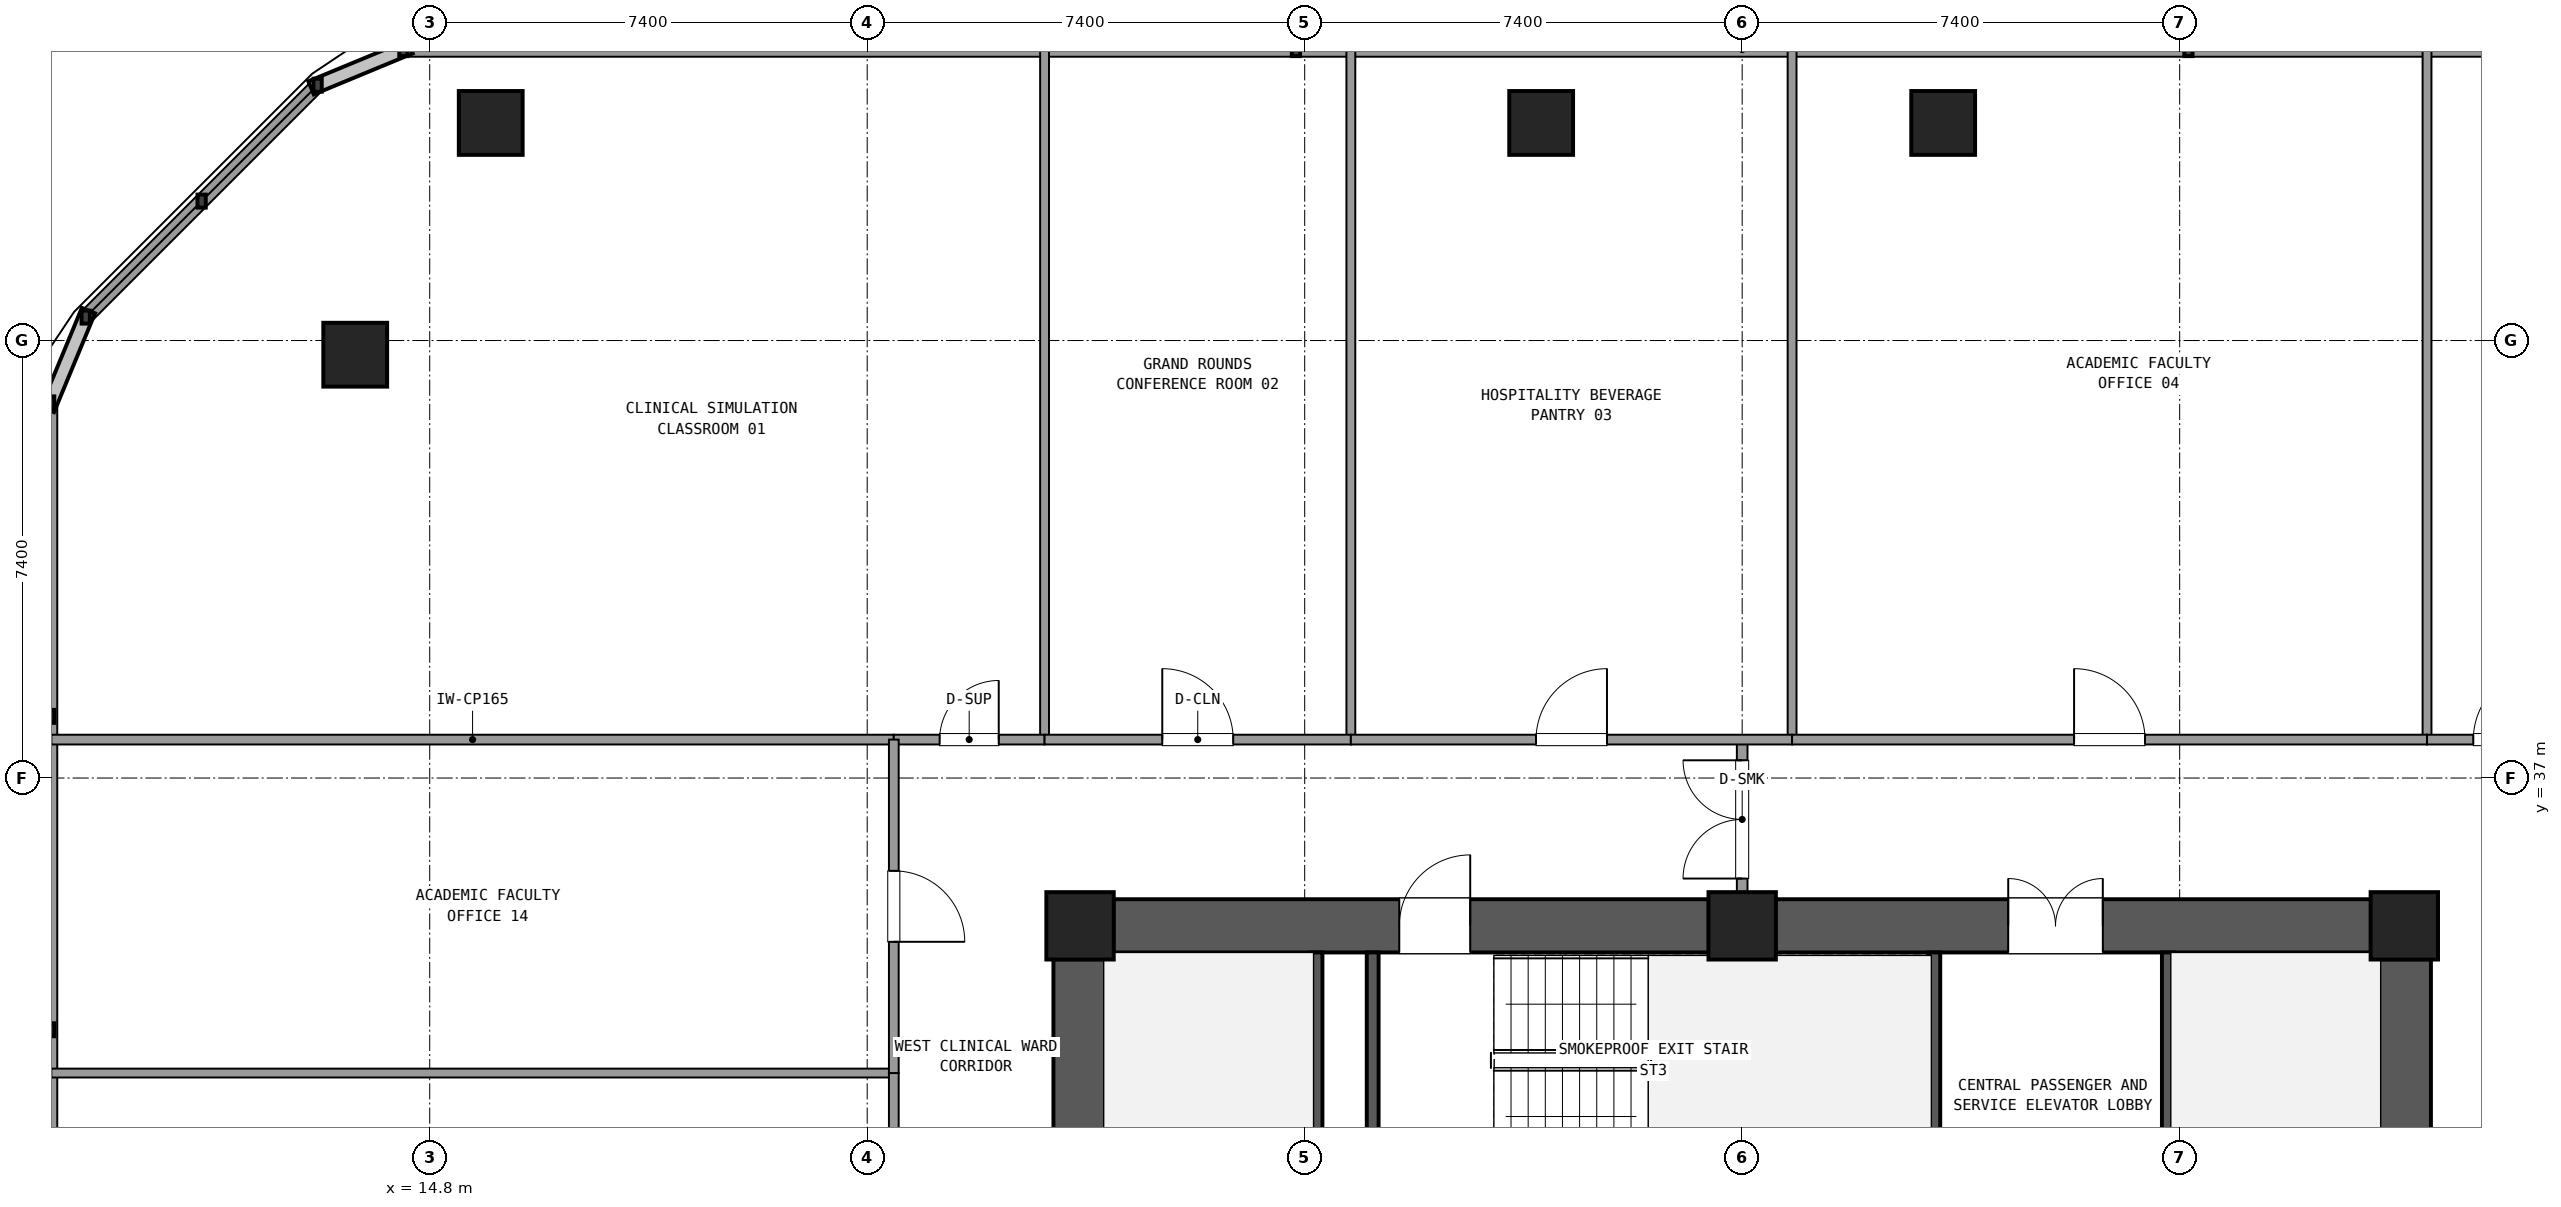
"""IFC4 building model, lengths in metres.
Left out: names, types, materials, properties, quantities, classifications, styles, units other than length and angle.
Written with IfcOpenShell. Run it as: python <this file> out.ifc"""

import sys

from ifc_helpers import new_model, si_unit, direction, frame, frame_2d, origin, origin_2d, place, context, subcontext, project, spatial, rectangle, extrude, element, fill, save


model = new_model("IFC4")
c1 = context("Model", 3, precision=1e-05, world=origin(), true_north=direction((0.0, 1.0)))
c2 = subcontext(c1, "Body", "Model", "MODEL_VIEW")
j1 = project(units=[si_unit("LENGTHUNIT", "METRE"), si_unit("PLANEANGLEUNIT", "RADIAN")], contexts=[c1])
p1 = place(None, origin())
s1 = spatial("IfcSite", under=j1, at=p1, CompositionType="ELEMENT")
p2 = place(p1, origin())
s2 = spatial("IfcBuilding", under=s1, at=p2, CompositionType="ELEMENT")
p3 = place(p2, frame((0.0, 0.0, 49.14)))
s3 = spatial("IfcBuildingStorey", under=s2, at=p3, CompositionType="ELEMENT", Elevation=49.14)
for number, where, z_axis, x_axis in (
    (1, (48.2, 34.5, 0.0), (0.0, 0.0, 1.0), (1.0, 0.0, 0.0)),
    (2, (37.0, 34.5, 0.0), (0.0, 0.0, 1.0), (1.0, 0.0, 0.0)),
    (3, (25.8, 34.5, 0.0), (0.0, 0.0, 1.0), (1.0, 0.0, 0.0)),
):
    element("IfcColumn", number, at=place(p3, frame(where, z_axis=z_axis, x_axis=x_axis)), inside=s3, PredefinedType="COLUMN", context=c2, shape_type="SweptSolid", body=[
        extrude(rectangle(XDim=1.14, YDim=1.14, at=origin_2d()), origin(), (0.0, 0.0, 1.0), 3.6),
    ])
p4 = place(p3, frame((48.2, 26.465, 0.0), z_axis=(0.0, 0.0, 1.0), x_axis=(0.0, 1.0, 0.0)))
e4 = element("IfcWall", 4, at=p4, inside=s3, PredefinedType="SHEAR", context=c2, shape_type="SweptSolid", body=[
    extrude(rectangle(XDim=7.47, YDim=0.9, at=frame_2d((3.735, 0.0))), origin(), (0.0, 0.0, 1.0), 3.32),
])
p5 = place(p3, frame((47.635, 34.5, 0.0), z_axis=(0.0, 0.0, 1.0), x_axis=(-1.0, 0.0, 0.0)))
e5 = element("IfcWall", 5, at=p5, inside=s3, PredefinedType="SHEAR", context=c2, shape_type="SweptSolid", body=[
    extrude(rectangle(XDim=10.07, YDim=0.9, at=frame_2d((5.035, 0.0))), origin(), (0.0, 0.0, 1.0), 3.32),
])
p6 = place(p5, frame((4.535, 0.0, 0.0)))
e6 = element("IfcOpeningElement", 6, at=p6, cuts=e5, PredefinedType="OPENING", context=c2, shape_type="SweptSolid", body=[
    extrude(rectangle(XDim=1.6, YDim=2.2, at=frame_2d((0.8, 1.1))), frame((0.0, 0.46, 0.0), z_axis=(0.0, -1.0, 0.0), x_axis=(1.0, 0.0, 0.0)), (0.0, 0.0, 1.0), 0.92),
])
p7 = place(p3, frame((36.435, 34.5, 0.0), z_axis=(0.0, 0.0, 1.0), x_axis=(-1.0, 0.0, 0.0)))
e7 = element("IfcWall", 7, at=p7, inside=s3, PredefinedType="SHEAR", context=c2, shape_type="SweptSolid", body=[
    extrude(rectangle(XDim=10.07, YDim=0.9, at=frame_2d((5.035, 0.0))), origin(), (0.0, 0.0, 1.0), 3.32),
])
p8 = place(p7, frame((4.035, 0.0, 0.0)))
e8 = element("IfcOpeningElement", 8, at=p8, cuts=e7, PredefinedType="OPENING", context=c2, shape_type="SweptSolid", body=[
    extrude(rectangle(XDim=1.2, YDim=2.15, at=frame_2d((0.6, 1.075))), frame((0.0, 0.46, 0.0), z_axis=(0.0, -1.0, 0.0), x_axis=(1.0, 0.0, 0.0)), (0.0, 0.0, 1.0), 0.92),
])
p9 = place(p3, frame((25.8, 33.935, 0.0), z_axis=(0.0, 0.0, 1.0), x_axis=(0.0, -1.0, 0.0)))
e9 = element("IfcWall", 9, at=p9, inside=s3, PredefinedType="SHEAR", context=c2, shape_type="SweptSolid", body=[
    extrude(rectangle(XDim=7.47, YDim=0.9, at=frame_2d((3.735, 0.0))), origin(), (0.0, 0.0, 1.0), 3.32),
])
for number, where, z_axis, x_axis in (
    (10, (40.4, 48.08, 0.0), (0.0, 0.0, 1.0), (1.0, 0.0, 0.0)),
    (11, (33.6, 48.08, 0.0), (0.0, 0.0, 1.0), (1.0, 0.0, 0.0)),
    (12, (15.832, 48.08, 0.0), (0.0, 0.0, 1.0), (1.0, 0.0, 0.0)),
    (13, (13.54, 44.16, 0.0), (0.0, 0.0, 1.0), (1.0, 0.0, 0.0)),
):
    element("IfcColumn", number, at=place(p3, frame(where, z_axis=z_axis, x_axis=x_axis)), inside=s3, PredefinedType="COLUMN", context=c2, shape_type="SweptSolid", body=[
        extrude(rectangle(XDim=1.08, YDim=1.08, at=origin_2d()), origin(), (0.0, 0.0, 1.0), 3.6),
    ])
p10 = place(p3, frame((59.645, 49.32, 0.0), z_axis=(0.0, 0.0, 1.0), x_axis=(-1.0, 0.0, 0.0)))
e14 = element("IfcWall", 14, at=p10, inside=s3, PredefinedType="SOLIDWALL", context=c2, shape_type="SweptSolid", body=[
    extrude(rectangle(XDim=45.29, YDim=0.24, at=frame_2d((22.645, 0.0))), origin(), (0.0, 0.0, 1.0), 0.85),
])
p11 = place(p3, frame((12.904, 48.719, 0.0), z_axis=(0.0, 0.0, 1.0), x_axis=(-0.707106781187, -0.707106781187, 0.0)))
e15 = element("IfcWall", 15, at=p11, inside=s3, PredefinedType="SOLIDWALL", context=c2, shape_type="SweptSolid", body=[
    extrude(rectangle(XDim=5.548, YDim=0.24, at=frame_2d((2.774, 0.0))), origin(), (0.0, 0.0, 1.0), 0.85),
])
p12 = place(p3, frame((8.38, 43.345, 0.0), z_axis=(0.0, 0.0, 1.0), x_axis=(0.0, -1.0, 0.0)))
e16 = element("IfcWall", 16, at=p12, inside=s3, PredefinedType="SOLIDWALL", context=c2, shape_type="SweptSolid", body=[
    extrude(rectangle(XDim=15.905, YDim=0.24, at=frame_2d((7.953, 0.0))), origin(), (0.0, 0.0, 1.0), 0.85),
])
for number, where, z_axis, x_axis in (
    (17, (29.8, 24.65, 0.0), (0.0, 0.0, 1.0), (0.0, 1.0, 0.0)),
    (18, (44.2, 24.65, 0.0), (0.0, 0.0, 1.0), (0.0, 1.0, 0.0)),
):
    element("IfcWall", number, at=place(p3, frame(where, z_axis=z_axis, x_axis=x_axis)), inside=s3, PredefinedType="SHEAR", context=c2, shape_type="SweptSolid", body=[
        extrude(rectangle(XDim=9.4, YDim=0.2, at=frame_2d((4.7, 0.0))), origin(), (0.0, 0.0, 1.0), 3.32),
    ])
for number, where, z_axis, x_axis in (
    (19, (30.75, 30.36, 0.0), (0.0, 0.0, 1.0), (0.0, 1.0, 0.0)),
    (20, (40.25, 30.36, 0.0), (0.0, 0.0, 1.0), (0.0, 1.0, 0.0)),
):
    element("IfcWall", number, at=place(p3, frame(where, z_axis=z_axis, x_axis=x_axis)), inside=s3, PredefinedType="SHEAR", context=c2, shape_type="SweptSolid", body=[
        extrude(rectangle(XDim=3.69, YDim=0.2, at=frame_2d((1.845, 0.0))), origin(), (0.0, 0.0, 1.0), 3.32),
    ])
p13 = place(p3, frame((37.0, 34.95, 0.0), z_axis=(0.0, 0.0, 1.0), x_axis=(0.0, 1.0, 0.0)))
e21 = element("IfcWall", 21, at=p13, inside=s3, PredefinedType="PARTITIONING", context=c2, shape_type="SweptSolid", body=[
    extrude(rectangle(XDim=2.7, YDim=0.18, at=frame_2d((1.35, 0.0))), origin(), (0.0, 0.0, 1.0), 2.61),
])
p14 = place(p13, frame((0.35, 0.0, 0.0)))
e22 = element("IfcOpeningElement", 22, at=p14, cuts=e21, PredefinedType="OPENING", context=c2, shape_type="SweptSolid", body=[
    extrude(rectangle(XDim=2.0, YDim=2.2, at=frame_2d((1.0, 1.1))), frame((0.0, 0.1, 0.0), z_axis=(0.0, -1.0, 0.0), x_axis=(1.0, 0.0, 0.0)), (0.0, 0.0, 1.0), 0.2),
])
p15 = place(p3, frame((8.4, 37.65, 0.0), z_axis=(0.0, 0.0, 1.0), x_axis=(1.0, 0.0, 0.0)))
e23 = element("IfcWall", 23, at=p15, inside=s3, PredefinedType="PARTITIONING", context=c2, shape_type="SweptSolid", body=[
    extrude(rectangle(XDim=14.25, YDim=0.165, at=frame_2d((7.125, 0.0))), origin(), (0.0, 0.0, 1.0), 2.61),
])
p16 = place(p3, frame((25.2, 37.65, 0.0), z_axis=(0.0, 0.0, 1.0), x_axis=(0.0, 1.0, 0.0)))
e24 = element("IfcWall", 24, at=p16, inside=s3, PredefinedType="PARTITIONING", context=c2, shape_type="SweptSolid", body=[
    extrude(rectangle(XDim=11.65, YDim=0.15, at=frame_2d((5.825, 0.0))), origin(), (0.0, 0.0, 1.0), 2.61),
])
p17 = place(p3, frame((22.65, 37.65, 0.0), z_axis=(0.0, 0.0, 1.0), x_axis=(1.0, 0.0, 0.0)))
e25 = element("IfcWall", 25, at=p17, inside=s3, PredefinedType="PARTITIONING", context=c2, shape_type="SweptSolid", body=[
    extrude(rectangle(XDim=2.55, YDim=0.165, at=frame_2d((1.275, 0.0))), origin(), (0.0, 0.0, 1.0), 2.61),
])
p18 = place(p17, frame((0.775, 0.0, 0.0)))
e26 = element("IfcOpeningElement", 26, at=p18, cuts=e25, PredefinedType="OPENING", context=c2, shape_type="SweptSolid", body=[
    extrude(rectangle(XDim=1.0, YDim=2.15, at=frame_2d((0.5, 1.075))), frame((0.0, 0.093, 0.0), z_axis=(0.0, -1.0, 0.0), x_axis=(1.0, 0.0, 0.0)), (0.0, 0.0, 1.0), 0.185),
])
p19 = place(p3, frame((30.381, 37.65, 0.0), z_axis=(0.0, 0.0, 1.0), x_axis=(0.0, 1.0, 0.0)))
e27 = element("IfcWall", 27, at=p19, inside=s3, PredefinedType="PARTITIONING", context=c2, shape_type="SweptSolid", body=[
    extrude(rectangle(XDim=11.65, YDim=0.15, at=frame_2d((5.825, 0.0))), origin(), (0.0, 0.0, 1.0), 2.61),
])
p20 = place(p3, frame((25.2, 37.65, 0.0), z_axis=(0.0, 0.0, 1.0), x_axis=(1.0, 0.0, 0.0)))
e28 = element("IfcWall", 28, at=p20, inside=s3, PredefinedType="PARTITIONING", context=c2, shape_type="SweptSolid", body=[
    extrude(rectangle(XDim=5.181, YDim=0.165, at=frame_2d((2.591, 0.0))), origin(), (0.0, 0.0, 1.0), 2.61),
])
p21 = place(p20, frame((1.991, 0.0, 0.0)))
e29 = element("IfcOpeningElement", 29, at=p21, cuts=e28, PredefinedType="OPENING", context=c2, shape_type="SweptSolid", body=[
    extrude(rectangle(XDim=1.2, YDim=2.15, at=frame_2d((0.6, 1.075))), frame((0.0, 0.093, 0.0), z_axis=(0.0, -1.0, 0.0), x_axis=(1.0, 0.0, 0.0)), (0.0, 0.0, 1.0), 0.185),
])
p22 = place(p3, frame((37.844, 37.65, 0.0), z_axis=(0.0, 0.0, 1.0), x_axis=(0.0, 1.0, 0.0)))
e30 = element("IfcWall", 30, at=p22, inside=s3, PredefinedType="PARTITIONING", context=c2, shape_type="SweptSolid", body=[
    extrude(rectangle(XDim=11.65, YDim=0.15, at=frame_2d((5.825, 0.0))), origin(), (0.0, 0.0, 1.0), 2.61),
])
p23 = place(p3, frame((30.381, 37.65, 0.0), z_axis=(0.0, 0.0, 1.0), x_axis=(1.0, 0.0, 0.0)))
e31 = element("IfcWall", 31, at=p23, inside=s3, PredefinedType="PARTITIONING", context=c2, shape_type="SweptSolid", body=[
    extrude(rectangle(XDim=7.463, YDim=0.165, at=frame_2d((3.731, 0.0))), origin(), (0.0, 0.0, 1.0), 2.61),
])
p24 = place(p23, frame((3.132, 0.0, 0.0)))
e32 = element("IfcOpeningElement", 32, at=p24, cuts=e31, PredefinedType="OPENING", context=c2, shape_type="SweptSolid", body=[
    extrude(rectangle(XDim=1.2, YDim=2.15, at=frame_2d((0.6, 1.075))), frame((0.0, 0.093, 0.0), z_axis=(0.0, -1.0, 0.0), x_axis=(1.0, 0.0, 0.0)), (0.0, 0.0, 1.0), 0.185),
])
p25 = place(p3, frame((48.584, 37.65, 0.0), z_axis=(0.0, 0.0, 1.0), x_axis=(0.0, 1.0, 0.0)))
e33 = element("IfcWall", 33, at=p25, inside=s3, PredefinedType="PARTITIONING", context=c2, shape_type="SweptSolid", body=[
    extrude(rectangle(XDim=11.65, YDim=0.15, at=frame_2d((5.825, 0.0))), origin(), (0.0, 0.0, 1.0), 2.61),
])
p26 = place(p3, frame((37.844, 37.65, 0.0), z_axis=(0.0, 0.0, 1.0), x_axis=(1.0, 0.0, 0.0)))
e34 = element("IfcWall", 34, at=p26, inside=s3, PredefinedType="PARTITIONING", context=c2, shape_type="SweptSolid", body=[
    extrude(rectangle(XDim=10.74, YDim=0.165, at=frame_2d((5.37, 0.0))), origin(), (0.0, 0.0, 1.0), 2.61),
])
p27 = place(p26, frame((4.77, 0.0, 0.0)))
e35 = element("IfcOpeningElement", 35, at=p27, cuts=e34, PredefinedType="OPENING", context=c2, shape_type="SweptSolid", body=[
    extrude(rectangle(XDim=1.2, YDim=2.15, at=frame_2d((0.6, 1.075))), frame((0.0, 0.093, 0.0), z_axis=(0.0, -1.0, 0.0), x_axis=(1.0, 0.0, 0.0)), (0.0, 0.0, 1.0), 0.185),
])
p28 = place(p3, frame((48.584, 37.65, 0.0), z_axis=(0.0, 0.0, 1.0), x_axis=(1.0, 0.0, 0.0)))
e36 = element("IfcWall", 36, at=p28, inside=s3, PredefinedType="PARTITIONING", context=c2, shape_type="SweptSolid", body=[
    extrude(rectangle(XDim=2.766, YDim=0.165, at=frame_2d((1.383, 0.0))), origin(), (0.0, 0.0, 1.0), 2.61),
])
p29 = place(p28, frame((0.783, 0.0, 0.0)))
e37 = element("IfcOpeningElement", 37, at=p29, cuts=e36, PredefinedType="OPENING", context=c2, shape_type="SweptSolid", body=[
    extrude(rectangle(XDim=1.2, YDim=2.15, at=frame_2d((0.6, 1.075))), frame((0.0, 0.093, 0.0), z_axis=(0.0, -1.0, 0.0), x_axis=(1.0, 0.0, 0.0)), (0.0, 0.0, 1.0), 0.185),
])
p30 = place(p3, frame((22.65, 32.01, 0.0), z_axis=(0.0, 0.0, 1.0), x_axis=(-1.0, 0.0, 0.0)))
e38 = element("IfcWall", 38, at=p30, inside=s3, PredefinedType="PARTITIONING", context=c2, shape_type="SweptSolid", body=[
    extrude(rectangle(XDim=14.25, YDim=0.15, at=frame_2d((7.125, 0.0))), origin(), (0.0, 0.0, 1.0), 2.61),
])
p31 = place(p3, frame((22.65, 27.7, 0.0), z_axis=(0.0, 0.0, 1.0), x_axis=(0.0, 1.0, 0.0)))
e39 = element("IfcWall", 39, at=p31, inside=s3, PredefinedType="PARTITIONING", context=c2, shape_type="SweptSolid", body=[
    extrude(rectangle(XDim=4.31, YDim=0.165, at=frame_2d((2.155, 0.0))), origin(), (0.0, 0.0, 1.0), 2.61),
])
p32 = place(p31, frame((1.555, 0.0, 0.0)))
e40 = element("IfcOpeningElement", 40, at=p32, cuts=e39, PredefinedType="OPENING", context=c2, shape_type="SweptSolid", body=[
    extrude(rectangle(XDim=1.2, YDim=2.15, at=frame_2d((0.6, 1.075))), frame((0.0, 0.093, 0.0), z_axis=(0.0, -1.0, 0.0), x_axis=(1.0, 0.0, 0.0)), (0.0, 0.0, 1.0), 0.185),
])
p33 = place(p3, frame((22.65, 32.01, 0.0), z_axis=(0.0, 0.0, 1.0), x_axis=(0.0, 1.0, 0.0)))
e41 = element("IfcWall", 41, at=p33, inside=s3, PredefinedType="PARTITIONING", context=c2, shape_type="SweptSolid", body=[
    extrude(rectangle(XDim=5.64, YDim=0.165, at=frame_2d((2.82, 0.0))), origin(), (0.0, 0.0, 1.0), 2.61),
])
p34 = place(p33, frame((2.22, 0.0, 0.0)))
e42 = element("IfcOpeningElement", 42, at=p34, cuts=e41, PredefinedType="OPENING", context=c2, shape_type="SweptSolid", body=[
    extrude(rectangle(XDim=1.2, YDim=2.15, at=frame_2d((0.6, 1.075))), frame((0.0, 0.093, 0.0), z_axis=(0.0, -1.0, 0.0), x_axis=(1.0, 0.0, 0.0)), (0.0, 0.0, 1.0), 0.185),
])
p35 = place(p6, frame((1.6, 0.0, 0.0), z_axis=(0.0, 0.0, 1.0), x_axis=(-1.0, 0.0, 0.0)))
e43 = element("IfcDoor", 43, at=p35, inside=s3, OperationType="DOUBLE_DOOR_SINGLE_SWING", PredefinedType="DOOR", context=c2, shape_type="SweptSolid", body=[
    extrude(rectangle(XDim=1.6, YDim=2.2, at=frame_2d((0.8, 1.1))), frame((0.0, 0.025, 0.0), z_axis=(0.0, -1.0, 0.0), x_axis=(1.0, 0.0, 0.0)), (0.0, 0.0, 1.0), 0.05),
])
fill(e6, e43)
p36 = place(p8, frame((1.2, 0.0, 0.0), z_axis=(0.0, 0.0, 1.0), x_axis=(-1.0, 0.0, 0.0)))
e44 = element("IfcDoor", 44, at=p36, inside=s3, OperationType="SINGLE_SWING_LEFT", PredefinedType="DOOR", context=c2, shape_type="SweptSolid", body=[
    extrude(rectangle(XDim=1.2, YDim=2.15, at=frame_2d((0.6, 1.075))), frame((0.0, 0.025, 0.0), z_axis=(0.0, -1.0, 0.0), x_axis=(1.0, 0.0, 0.0)), (0.0, 0.0, 1.0), 0.05),
])
fill(e8, e44)
p37 = place(p14, origin())
e45 = element("IfcDoor", 45, at=p37, inside=s3, OperationType="DOUBLE_DOOR_SINGLE_SWING", PredefinedType="DOOR", context=c2, shape_type="SweptSolid", body=[
    extrude(rectangle(XDim=2.0, YDim=2.2, at=frame_2d((1.0, 1.1))), frame((0.0, 0.025, 0.0), z_axis=(0.0, -1.0, 0.0), x_axis=(1.0, 0.0, 0.0)), (0.0, 0.0, 1.0), 0.05),
])
fill(e22, e45)
p38 = place(p18, origin())
e46 = element("IfcDoor", 46, at=p38, inside=s3, OperationType="SINGLE_SWING_RIGHT", PredefinedType="DOOR", context=c2, shape_type="SweptSolid", body=[
    extrude(rectangle(XDim=1.0, YDim=2.15, at=frame_2d((0.5, 1.075))), frame((0.0, 0.025, 0.0), z_axis=(0.0, -1.0, 0.0), x_axis=(1.0, 0.0, 0.0)), (0.0, 0.0, 1.0), 0.05),
])
fill(e26, e46)
p39 = place(p21, origin())
e47 = element("IfcDoor", 47, at=p39, inside=s3, OperationType="SINGLE_SWING_LEFT", PredefinedType="DOOR", context=c2, shape_type="SweptSolid", body=[
    extrude(rectangle(XDim=1.2, YDim=2.15, at=frame_2d((0.6, 1.075))), frame((0.0, 0.025, 0.0), z_axis=(0.0, -1.0, 0.0), x_axis=(1.0, 0.0, 0.0)), (0.0, 0.0, 1.0), 0.05),
])
fill(e29, e47)
p40 = place(p24, origin())
e48 = element("IfcDoor", 48, at=p40, inside=s3, OperationType="SINGLE_SWING_RIGHT", PredefinedType="DOOR", context=c2, shape_type="SweptSolid", body=[
    extrude(rectangle(XDim=1.2, YDim=2.15, at=frame_2d((0.6, 1.075))), frame((0.0, 0.025, 0.0), z_axis=(0.0, -1.0, 0.0), x_axis=(1.0, 0.0, 0.0)), (0.0, 0.0, 1.0), 0.05),
])
fill(e32, e48)
p41 = place(p27, origin())
e49 = element("IfcDoor", 49, at=p41, inside=s3, OperationType="SINGLE_SWING_LEFT", PredefinedType="DOOR", context=c2, shape_type="SweptSolid", body=[
    extrude(rectangle(XDim=1.2, YDim=2.15, at=frame_2d((0.6, 1.075))), frame((0.0, 0.025, 0.0), z_axis=(0.0, -1.0, 0.0), x_axis=(1.0, 0.0, 0.0)), (0.0, 0.0, 1.0), 0.05),
])
fill(e35, e49)
p42 = place(p29, origin())
e50 = element("IfcDoor", 50, at=p42, inside=s3, OperationType="SINGLE_SWING_RIGHT", PredefinedType="DOOR", context=c2, shape_type="SweptSolid", body=[
    extrude(rectangle(XDim=1.2, YDim=2.15, at=frame_2d((0.6, 1.075))), frame((0.0, 0.025, 0.0), z_axis=(0.0, -1.0, 0.0), x_axis=(1.0, 0.0, 0.0)), (0.0, 0.0, 1.0), 0.05),
])
fill(e37, e50)
p43 = place(p34, frame((1.2, 0.0, 0.0), z_axis=(0.0, 0.0, 1.0), x_axis=(-1.0, 0.0, 0.0)))
e51 = element("IfcDoor", 51, at=p43, inside=s3, OperationType="SINGLE_SWING_LEFT", PredefinedType="DOOR", context=c2, shape_type="SweptSolid", body=[
    extrude(rectangle(XDim=1.2, YDim=2.15, at=frame_2d((0.6, 1.075))), frame((0.0, 0.025, 0.0), z_axis=(0.0, -1.0, 0.0), x_axis=(1.0, 0.0, 0.0)), (0.0, 0.0, 1.0), 0.05),
])
fill(e42, e51)
save(model, sys.argv[1])
